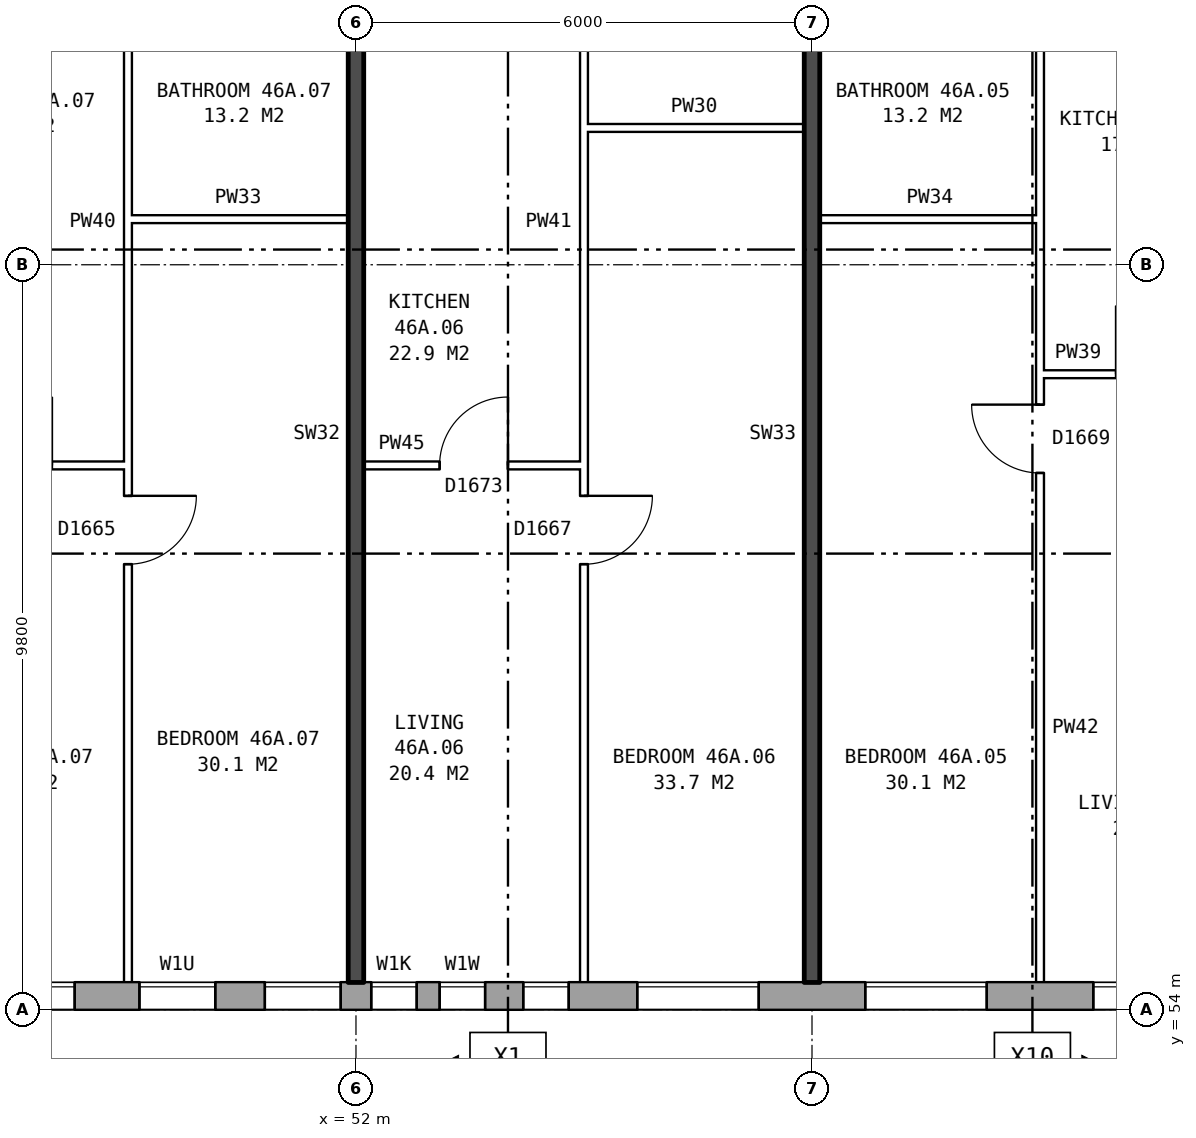
"""IFC4 building model, lengths in metres.
Left out: names, types, materials, properties, quantities, classifications, styles, units other than length and angle.
Written with IfcOpenShell. Run it as: python <this file> out.ifc"""

import sys

from ifc_helpers import new_model, si_unit, direction, frame, frame_2d, origin, place, context, subcontext, project, spatial, rectangle, extrude, element, fill, save


model = new_model("IFC4")
c1 = context("Model", 3, precision=1e-05, world=origin(), true_north=direction((0.0, 1.0)))
c2 = subcontext(c1, "Body", "Model", "MODEL_VIEW")
j1 = project(units=[si_unit("LENGTHUNIT", "METRE"), si_unit("PLANEANGLEUNIT", "RADIAN")], contexts=[c1])
p1 = place(None, origin())
s1 = spatial("IfcSite", under=j1, at=p1, CompositionType="ELEMENT")
p2 = place(p1, origin())
s2 = spatial("IfcBuilding", under=s1, at=p2, CompositionType="ELEMENT")
p3 = place(p2, frame((0.0, 0.0, 164.0)))
s3 = spatial("IfcBuildingStorey", under=s2, at=p3, CompositionType="ELEMENT", Elevation=164.0)
p4 = place(p3, frame((31.575, 54.18, 0.0), z_axis=(0.0, 0.0, 1.0), x_axis=(1.0, 0.0, 0.0)))
e1 = element("IfcWall", 1, at=p4, inside=s3, PredefinedType="STANDARD", context=c2, shape_type="SweptSolid", body=[
    extrude(rectangle(XDim=41.351, YDim=0.36, at=frame_2d((20.675, 0.0))), origin(), (0.0, 0.0, 1.0), 2.85),
])
p5 = place(p4, frame((3.125, 0.0, 0.8)))
e2 = element("IfcOpeningElement", 2, at=p5, cuts=e1, PredefinedType="OPENING", context=c2, shape_type="SweptSolid", body=[
    extrude(rectangle(XDim=1.6, YDim=1.8, at=frame_2d((0.8, 0.9))), frame((0.0, 0.19, 0.0), z_axis=(0.0, -1.0, 0.0), x_axis=(1.0, 0.0, 0.0)), (0.0, 0.0, 1.0), 0.38),
])
p6 = place(p4, frame((6.125, 0.0, 0.8)))
e3 = element("IfcOpeningElement", 3, at=p6, cuts=e1, PredefinedType="OPENING", context=c2, shape_type="SweptSolid", body=[
    extrude(rectangle(XDim=1.6, YDim=1.8, at=frame_2d((0.8, 0.9))), frame((0.0, 0.19, 0.0), z_axis=(0.0, -1.0, 0.0), x_axis=(1.0, 0.0, 0.0)), (0.0, 0.0, 1.0), 0.38),
])
p7 = place(p4, frame((9.125, 0.0, 0.8)))
e4 = element("IfcOpeningElement", 4, at=p7, cuts=e1, PredefinedType="OPENING", context=c2, shape_type="SweptSolid", body=[
    extrude(rectangle(XDim=1.6, YDim=1.8, at=frame_2d((0.8, 0.9))), frame((0.0, 0.19, 0.0), z_axis=(0.0, -1.0, 0.0), x_axis=(1.0, 0.0, 0.0)), (0.0, 0.0, 1.0), 0.38),
])
p8 = place(p4, frame((12.125, 0.0, 0.8)))
e5 = element("IfcOpeningElement", 5, at=p8, cuts=e1, PredefinedType="OPENING", context=c2, shape_type="SweptSolid", body=[
    extrude(rectangle(XDim=1.6, YDim=1.8, at=frame_2d((0.8, 0.9))), frame((0.0, 0.19, 0.0), z_axis=(0.0, -1.0, 0.0), x_axis=(1.0, 0.0, 0.0)), (0.0, 0.0, 1.0), 0.38),
])
p9 = place(p4, frame((15.125, 0.0, 0.8)))
e6 = element("IfcOpeningElement", 6, at=p9, cuts=e1, PredefinedType="OPENING", context=c2, shape_type="SweptSolid", body=[
    extrude(rectangle(XDim=1.6, YDim=1.8, at=frame_2d((0.8, 0.9))), frame((0.0, 0.19, 0.0), z_axis=(0.0, -1.0, 0.0), x_axis=(1.0, 0.0, 0.0)), (0.0, 0.0, 1.0), 0.38),
])
p10 = place(p4, frame((17.575, 0.0, 1.55)))
e7 = element("IfcOpeningElement", 7, at=p10, cuts=e1, PredefinedType="OPENING", context=c2, shape_type="SweptSolid", body=[
    extrude(rectangle(XDim=1.0, YDim=0.9, at=frame_2d((0.5, 0.45))), frame((0.0, 0.19, 0.0), z_axis=(0.0, -1.0, 0.0), x_axis=(1.0, 0.0, 0.0)), (0.0, 0.0, 1.0), 0.38),
])
p11 = place(p4, frame((20.625, 0.0, 0.25)))
e8 = element("IfcOpeningElement", 8, at=p11, cuts=e1, PredefinedType="OPENING", context=c2, shape_type="SweptSolid", body=[
    extrude(rectangle(XDim=0.6, YDim=1.5, at=frame_2d((0.3, 0.75))), frame((0.0, 0.19, 0.0), z_axis=(0.0, -1.0, 0.0), x_axis=(1.0, 0.0, 0.0)), (0.0, 0.0, 1.0), 0.38),
])
p12 = place(p4, frame((24.125, 0.0, 0.8)))
e9 = element("IfcOpeningElement", 9, at=p12, cuts=e1, PredefinedType="OPENING", context=c2, shape_type="SweptSolid", body=[
    extrude(rectangle(XDim=1.6, YDim=1.8, at=frame_2d((0.8, 0.9))), frame((0.0, 0.19, 0.0), z_axis=(0.0, -1.0, 0.0), x_axis=(1.0, 0.0, 0.0)), (0.0, 0.0, 1.0), 0.38),
])
p13 = place(p4, frame((27.125, 0.0, 0.8)))
e10 = element("IfcOpeningElement", 10, at=p13, cuts=e1, PredefinedType="OPENING", context=c2, shape_type="SweptSolid", body=[
    extrude(rectangle(XDim=1.6, YDim=1.8, at=frame_2d((0.8, 0.9))), frame((0.0, 0.19, 0.0), z_axis=(0.0, -1.0, 0.0), x_axis=(1.0, 0.0, 0.0)), (0.0, 0.0, 1.0), 0.38),
])
p14 = place(p4, frame((30.125, 0.0, 0.8)))
e11 = element("IfcOpeningElement", 11, at=p14, cuts=e1, PredefinedType="OPENING", context=c2, shape_type="SweptSolid", body=[
    extrude(rectangle(XDim=1.6, YDim=1.8, at=frame_2d((0.8, 0.9))), frame((0.0, 0.19, 0.0), z_axis=(0.0, -1.0, 0.0), x_axis=(1.0, 0.0, 0.0)), (0.0, 0.0, 1.0), 0.38),
])
p15 = place(p4, frame((33.125, 0.0, 0.8)))
e12 = element("IfcOpeningElement", 12, at=p15, cuts=e1, PredefinedType="OPENING", context=c2, shape_type="SweptSolid", body=[
    extrude(rectangle(XDim=1.6, YDim=1.8, at=frame_2d((0.8, 0.9))), frame((0.0, 0.19, 0.0), z_axis=(0.0, -1.0, 0.0), x_axis=(1.0, 0.0, 0.0)), (0.0, 0.0, 1.0), 0.38),
])
p16 = place(p4, frame((36.125, 0.0, 0.8)))
e13 = element("IfcOpeningElement", 13, at=p16, cuts=e1, PredefinedType="OPENING", context=c2, shape_type="SweptSolid", body=[
    extrude(rectangle(XDim=1.6, YDim=1.8, at=frame_2d((0.8, 0.9))), frame((0.0, 0.19, 0.0), z_axis=(0.0, -1.0, 0.0), x_axis=(1.0, 0.0, 0.0)), (0.0, 0.0, 1.0), 0.38),
])
p17 = place(p4, frame((39.125, 0.0, 0.8)))
e14 = element("IfcOpeningElement", 14, at=p17, cuts=e1, PredefinedType="OPENING", context=c2, shape_type="SweptSolid", body=[
    extrude(rectangle(XDim=1.6, YDim=1.8, at=frame_2d((0.8, 0.9))), frame((0.0, 0.19, 0.0), z_axis=(0.0, -1.0, 0.0), x_axis=(1.0, 0.0, 0.0)), (0.0, 0.0, 1.0), 0.38),
])
p18 = place(p4, frame((19.225, 0.0, 0.15)))
e15 = element("IfcOpeningElement", 15, at=p18, cuts=e1, PredefinedType="OPENING", context=c2, shape_type="SweptSolid", body=[
    extrude(rectangle(XDim=1.0, YDim=0.9, at=frame_2d((0.5, 0.45))), frame((0.0, 0.19, 0.0), z_axis=(0.0, -1.0, 0.0), x_axis=(1.0, 0.0, 0.0)), (0.0, 0.0, 1.0), 0.38),
])
p19 = place(p4, frame((21.525, 0.0, 0.15)))
e16 = element("IfcOpeningElement", 16, at=p19, cuts=e1, PredefinedType="OPENING", context=c2, shape_type="SweptSolid", body=[
    extrude(rectangle(XDim=0.6, YDim=0.9, at=frame_2d((0.3, 0.45))), frame((0.0, 0.19, 0.0), z_axis=(0.0, -1.0, 0.0), x_axis=(1.0, 0.0, 0.0)), (0.0, 0.0, 1.0), 0.38),
])
p20 = place(p4, frame((22.625, 0.0, 1.65)))
e17 = element("IfcOpeningElement", 17, at=p20, cuts=e1, PredefinedType="OPENING", context=c2, shape_type="SweptSolid", body=[
    extrude(rectangle(XDim=0.6, YDim=0.9, at=frame_2d((0.3, 0.45))), frame((0.0, 0.19, 0.0), z_axis=(0.0, -1.0, 0.0), x_axis=(1.0, 0.0, 0.0)), (0.0, 0.0, 1.0), 0.38),
])
p21 = place(p3, frame((46.1, 61.16, 0.0), z_axis=(0.0, 0.0, 1.0), x_axis=(1.0, 0.0, 0.0)))
e18 = element("IfcWall", 18, at=p21, inside=s3, PredefinedType="PARTITIONING", context=c2, shape_type="SweptSolid", body=[
    extrude(rectangle(XDim=2.9, YDim=0.1, at=frame_2d((1.45, 0.0))), origin(), (0.0, 0.0, 1.0), 2.85),
])
p22 = place(p21, frame((1.0, 0.0, 0.0)))
e19 = element("IfcOpeningElement", 19, at=p22, cuts=e18, PredefinedType="OPENING", context=c2, shape_type="SweptSolid", body=[
    extrude(rectangle(XDim=0.9, YDim=2.1, at=frame_2d((0.45, 1.05))), frame((0.0, 0.06, 0.0), z_axis=(0.0, -1.0, 0.0), x_axis=(1.0, 0.0, 0.0)), (0.0, 0.0, 1.0), 0.12),
])
p23 = place(p3, frame((52.1, 61.16, 0.0), z_axis=(0.0, 0.0, 1.0), x_axis=(1.0, 0.0, 0.0)))
e20 = element("IfcWall", 20, at=p23, inside=s3, PredefinedType="PARTITIONING", context=c2, shape_type="SweptSolid", body=[
    extrude(rectangle(XDim=2.9, YDim=0.1, at=frame_2d((1.45, 0.0))), origin(), (0.0, 0.0, 1.0), 2.85),
])
p24 = place(p23, frame((1.0, 0.0, 0.0)))
e21 = element("IfcOpeningElement", 21, at=p24, cuts=e20, PredefinedType="OPENING", context=c2, shape_type="SweptSolid", body=[
    extrude(rectangle(XDim=0.9, YDim=2.1, at=frame_2d((0.45, 1.05))), frame((0.0, 0.06, 0.0), z_axis=(0.0, -1.0, 0.0), x_axis=(1.0, 0.0, 0.0)), (0.0, 0.0, 1.0), 0.12),
])
p25 = place(p3, frame((61.0, 62.36, 0.0), z_axis=(0.0, 0.0, 1.0), x_axis=(1.0, 0.0, 0.0)))
e22 = element("IfcWall", 22, at=p25, inside=s3, PredefinedType="PARTITIONING", context=c2, shape_type="SweptSolid", body=[
    extrude(rectangle(XDim=2.9, YDim=0.1, at=frame_2d((1.45, 0.0))), origin(), (0.0, 0.0, 1.0), 2.85),
])
p26 = place(p25, frame((1.0, 0.0, 0.0)))
e23 = element("IfcOpeningElement", 23, at=p26, cuts=e22, PredefinedType="OPENING", context=c2, shape_type="SweptSolid", body=[
    extrude(rectangle(XDim=0.9, YDim=2.1, at=frame_2d((0.45, 1.05))), frame((0.0, 0.06, 0.0), z_axis=(0.0, -1.0, 0.0), x_axis=(1.0, 0.0, 0.0)), (0.0, 0.0, 1.0), 0.12),
])
for number, where, z_axis, x_axis in (
    (24, (49.0, 64.4, 0.0), (0.0, 0.0, 1.0), (1.0, 0.0, 0.0)),
    (25, (58.1, 64.4, 0.0), (0.0, 0.0, 1.0), (1.0, 0.0, 0.0)),
    (26, (55.0, 65.6, 0.0), (0.0, 0.0, 1.0), (1.0, 0.0, 0.0)),
):
    element("IfcWall", number, at=place(p3, frame(where, z_axis=z_axis, x_axis=x_axis)), inside=s3, PredefinedType="PARTITIONING", context=c2, shape_type="SweptSolid", body=[
        extrude(rectangle(XDim=2.9, YDim=0.1, at=frame_2d((1.45, 0.0))), origin(), (0.0, 0.0, 1.0), 2.85),
    ])
p27 = place(p3, frame((49.0, 54.36, 0.0), z_axis=(0.0, 0.0, 1.0), x_axis=(0.0, 1.0, 0.0)))
e27 = element("IfcWall", 27, at=p27, inside=s3, PredefinedType="PARTITIONING", context=c2, shape_type="SweptSolid", body=[
    extrude(rectangle(XDim=14.34, YDim=0.1, at=frame_2d((7.17, 0.0))), origin(), (0.0, 0.0, 1.0), 2.85),
])
p28 = place(p27, frame((5.5, 0.0, 0.0)))
e28 = element("IfcOpeningElement", 28, at=p28, cuts=e27, PredefinedType="OPENING", context=c2, shape_type="SweptSolid", body=[
    extrude(rectangle(XDim=0.9, YDim=2.1, at=frame_2d((0.45, 1.05))), frame((0.0, 0.06, 0.0), z_axis=(0.0, -1.0, 0.0), x_axis=(1.0, 0.0, 0.0)), (0.0, 0.0, 1.0), 0.12),
])
p29 = place(p27, frame((13.04, 0.0, 0.0)))
e29 = element("IfcOpeningElement", 29, at=p29, cuts=e27, PredefinedType="OPENING", context=c2, shape_type="SweptSolid", body=[
    extrude(rectangle(XDim=0.9, YDim=2.1, at=frame_2d((0.45, 1.05))), frame((0.0, 0.06, 0.0), z_axis=(0.0, -1.0, 0.0), x_axis=(1.0, 0.0, 0.0)), (0.0, 0.0, 1.0), 0.12),
])
p30 = place(p3, frame((52.0, 54.36, 0.0), z_axis=(0.0, 0.0, 1.0), x_axis=(0.0, 1.0, 0.0)))
e30 = element("IfcWall", 30, at=p30, inside=s3, PredefinedType="SOLIDWALL", context=c2, shape_type="SweptSolid", body=[
    extrude(rectangle(XDim=14.44, YDim=0.2, at=frame_2d((7.22, 0.0))), origin(), (0.0, 0.0, 1.0), 2.85),
])
p31 = place(p3, frame((55.0, 54.36, 0.0), z_axis=(0.0, 0.0, 1.0), x_axis=(0.0, 1.0, 0.0)))
e31 = element("IfcWall", 31, at=p31, inside=s3, PredefinedType="PARTITIONING", context=c2, shape_type="SweptSolid", body=[
    extrude(rectangle(XDim=14.34, YDim=0.1, at=frame_2d((7.17, 0.0))), origin(), (0.0, 0.0, 1.0), 2.85),
])
p32 = place(p31, frame((5.5, 0.0, 0.0)))
e32 = element("IfcOpeningElement", 32, at=p32, cuts=e31, PredefinedType="OPENING", context=c2, shape_type="SweptSolid", body=[
    extrude(rectangle(XDim=0.9, YDim=2.1, at=frame_2d((0.45, 1.05))), frame((0.0, 0.06, 0.0), z_axis=(0.0, -1.0, 0.0), x_axis=(1.0, 0.0, 0.0)), (0.0, 0.0, 1.0), 0.12),
])
p33 = place(p31, frame((13.04, 0.0, 0.0)))
e33 = element("IfcOpeningElement", 33, at=p33, cuts=e31, PredefinedType="OPENING", context=c2, shape_type="SweptSolid", body=[
    extrude(rectangle(XDim=0.9, YDim=2.1, at=frame_2d((0.45, 1.05))), frame((0.0, 0.06, 0.0), z_axis=(0.0, -1.0, 0.0), x_axis=(1.0, 0.0, 0.0)), (0.0, 0.0, 1.0), 0.12),
])
p34 = place(p3, frame((58.0, 54.36, 0.0), z_axis=(0.0, 0.0, 1.0), x_axis=(0.0, 1.0, 0.0)))
e34 = element("IfcWall", 34, at=p34, inside=s3, PredefinedType="SOLIDWALL", context=c2, shape_type="SweptSolid", body=[
    extrude(rectangle(XDim=14.44, YDim=0.2, at=frame_2d((7.22, 0.0))), origin(), (0.0, 0.0, 1.0), 2.85),
])
p35 = place(p3, frame((61.0, 54.36, 0.0), z_axis=(0.0, 0.0, 1.0), x_axis=(0.0, 1.0, 0.0)))
e35 = element("IfcWall", 35, at=p35, inside=s3, PredefinedType="PARTITIONING", context=c2, shape_type="SweptSolid", body=[
    extrude(rectangle(XDim=14.34, YDim=0.1, at=frame_2d((7.17, 0.0))), origin(), (0.0, 0.0, 1.0), 2.85),
])
p36 = place(p35, frame((6.7, 0.0, 0.0)))
e36 = element("IfcOpeningElement", 36, at=p36, cuts=e35, PredefinedType="OPENING", context=c2, shape_type="SweptSolid", body=[
    extrude(rectangle(XDim=0.9, YDim=2.1, at=frame_2d((0.45, 1.05))), frame((0.0, 0.06, 0.0), z_axis=(0.0, -1.0, 0.0), x_axis=(1.0, 0.0, 0.0)), (0.0, 0.0, 1.0), 0.12),
])
p37 = place(p35, frame((12.54, 0.0, 0.0)))
e37 = element("IfcOpeningElement", 37, at=p37, cuts=e35, PredefinedType="OPENING", context=c2, shape_type="SweptSolid", body=[
    extrude(rectangle(XDim=0.9, YDim=2.1, at=frame_2d((0.45, 1.05))), frame((0.0, 0.06, 0.0), z_axis=(0.0, -1.0, 0.0), x_axis=(1.0, 0.0, 0.0)), (0.0, 0.0, 1.0), 0.12),
])
p38 = place(p9, origin())
e38 = element("IfcWindow", 38, at=p38, inside=s3, PartitioningType="SINGLE_PANEL", PredefinedType="WINDOW", context=c2, shape_type="SweptSolid", body=[
    extrude(rectangle(XDim=1.6, YDim=1.8, at=frame_2d((0.8, 0.9))), frame((0.0, 0.15, 0.0), z_axis=(0.0, -1.0, 0.0), x_axis=(1.0, 0.0, 0.0)), (0.0, 0.0, 1.0), 0.06),
])
fill(e6, e38)
p39 = place(p10, origin())
e39 = element("IfcWindow", 39, at=p39, inside=s3, PartitioningType="SINGLE_PANEL", PredefinedType="WINDOW", context=c2, shape_type="SweptSolid", body=[
    extrude(rectangle(XDim=1.0, YDim=0.9, at=frame_2d((0.5, 0.45))), frame((0.0, 0.15, 0.0), z_axis=(0.0, -1.0, 0.0), x_axis=(1.0, 0.0, 0.0)), (0.0, 0.0, 1.0), 0.06),
])
fill(e7, e39)
p40 = place(p11, origin())
e40 = element("IfcWindow", 40, at=p40, inside=s3, PartitioningType="SINGLE_PANEL", PredefinedType="WINDOW", context=c2, shape_type="SweptSolid", body=[
    extrude(rectangle(XDim=0.6, YDim=1.5, at=frame_2d((0.3, 0.75))), frame((0.0, 0.15, 0.0), z_axis=(0.0, -1.0, 0.0), x_axis=(1.0, 0.0, 0.0)), (0.0, 0.0, 1.0), 0.06),
])
fill(e8, e40)
p41 = place(p12, origin())
e41 = element("IfcWindow", 41, at=p41, inside=s3, PartitioningType="SINGLE_PANEL", PredefinedType="WINDOW", context=c2, shape_type="SweptSolid", body=[
    extrude(rectangle(XDim=1.6, YDim=1.8, at=frame_2d((0.8, 0.9))), frame((0.0, 0.15, 0.0), z_axis=(0.0, -1.0, 0.0), x_axis=(1.0, 0.0, 0.0)), (0.0, 0.0, 1.0), 0.06),
])
fill(e9, e41)
p42 = place(p13, origin())
e42 = element("IfcWindow", 42, at=p42, inside=s3, PartitioningType="SINGLE_PANEL", PredefinedType="WINDOW", context=c2, shape_type="SweptSolid", body=[
    extrude(rectangle(XDim=1.6, YDim=1.8, at=frame_2d((0.8, 0.9))), frame((0.0, 0.15, 0.0), z_axis=(0.0, -1.0, 0.0), x_axis=(1.0, 0.0, 0.0)), (0.0, 0.0, 1.0), 0.06),
])
fill(e10, e42)
p43 = place(p14, origin())
e43 = element("IfcWindow", 43, at=p43, inside=s3, PartitioningType="SINGLE_PANEL", PredefinedType="WINDOW", context=c2, shape_type="SweptSolid", body=[
    extrude(rectangle(XDim=1.6, YDim=1.8, at=frame_2d((0.8, 0.9))), frame((0.0, 0.15, 0.0), z_axis=(0.0, -1.0, 0.0), x_axis=(1.0, 0.0, 0.0)), (0.0, 0.0, 1.0), 0.06),
])
fill(e11, e43)
p44 = place(p36, origin())
e44 = element("IfcDoor", 44, at=p44, inside=s3, OperationType="SINGLE_SWING_RIGHT", PredefinedType="DOOR", context=c2, shape_type="SweptSolid", body=[
    extrude(rectangle(XDim=0.9, YDim=2.1, at=frame_2d((0.45, 1.05))), frame((0.0, 0.025, 0.0), z_axis=(0.0, -1.0, 0.0), x_axis=(1.0, 0.0, 0.0)), (0.0, 0.0, 1.0), 0.05),
])
fill(e36, e44)
p45 = place(p32, frame((0.9, 0.0, 0.0), z_axis=(0.0, 0.0, 1.0), x_axis=(-1.0, 0.0, 0.0)))
e45 = element("IfcDoor", 45, at=p45, inside=s3, OperationType="SINGLE_SWING_LEFT", PredefinedType="DOOR", context=c2, shape_type="SweptSolid", body=[
    extrude(rectangle(XDim=0.9, YDim=2.1, at=frame_2d((0.45, 1.05))), frame((0.0, 0.025, 0.0), z_axis=(0.0, -1.0, 0.0), x_axis=(1.0, 0.0, 0.0)), (0.0, 0.0, 1.0), 0.05),
])
fill(e32, e45)
p46 = place(p24, origin())
e46 = element("IfcDoor", 46, at=p46, inside=s3, OperationType="SINGLE_SWING_RIGHT", PredefinedType="DOOR", context=c2, shape_type="SweptSolid", body=[
    extrude(rectangle(XDim=0.9, YDim=2.1, at=frame_2d((0.45, 1.05))), frame((0.0, 0.025, 0.0), z_axis=(0.0, -1.0, 0.0), x_axis=(1.0, 0.0, 0.0)), (0.0, 0.0, 1.0), 0.05),
])
fill(e21, e46)
p47 = place(p28, frame((0.9, 0.0, 0.0), z_axis=(0.0, 0.0, 1.0), x_axis=(-1.0, 0.0, 0.0)))
e47 = element("IfcDoor", 47, at=p47, inside=s3, OperationType="SINGLE_SWING_LEFT", PredefinedType="DOOR", context=c2, shape_type="SweptSolid", body=[
    extrude(rectangle(XDim=0.9, YDim=2.1, at=frame_2d((0.45, 1.05))), frame((0.0, 0.025, 0.0), z_axis=(0.0, -1.0, 0.0), x_axis=(1.0, 0.0, 0.0)), (0.0, 0.0, 1.0), 0.05),
])
fill(e28, e47)
p48 = place(p18, origin())
e48 = element("IfcWindow", 48, at=p48, inside=s3, PartitioningType="SINGLE_PANEL", PredefinedType="WINDOW", context=c2, shape_type="SweptSolid", body=[
    extrude(rectangle(XDim=1.0, YDim=0.9, at=frame_2d((0.5, 0.45))), frame((0.0, 0.15, 0.0), z_axis=(0.0, -1.0, 0.0), x_axis=(1.0, 0.0, 0.0)), (0.0, 0.0, 1.0), 0.06),
])
fill(e15, e48)
p49 = place(p19, origin())
e49 = element("IfcWindow", 49, at=p49, inside=s3, PartitioningType="SINGLE_PANEL", PredefinedType="WINDOW", context=c2, shape_type="SweptSolid", body=[
    extrude(rectangle(XDim=0.6, YDim=0.9, at=frame_2d((0.3, 0.45))), frame((0.0, 0.15, 0.0), z_axis=(0.0, -1.0, 0.0), x_axis=(1.0, 0.0, 0.0)), (0.0, 0.0, 1.0), 0.06),
])
fill(e16, e49)
p50 = place(p20, origin())
e50 = element("IfcWindow", 50, at=p50, inside=s3, PartitioningType="SINGLE_PANEL", PredefinedType="WINDOW", context=c2, shape_type="SweptSolid", body=[
    extrude(rectangle(XDim=0.6, YDim=0.9, at=frame_2d((0.3, 0.45))), frame((0.0, 0.15, 0.0), z_axis=(0.0, -1.0, 0.0), x_axis=(1.0, 0.0, 0.0)), (0.0, 0.0, 1.0), 0.06),
])
fill(e17, e50)
save(model, sys.argv[1])
